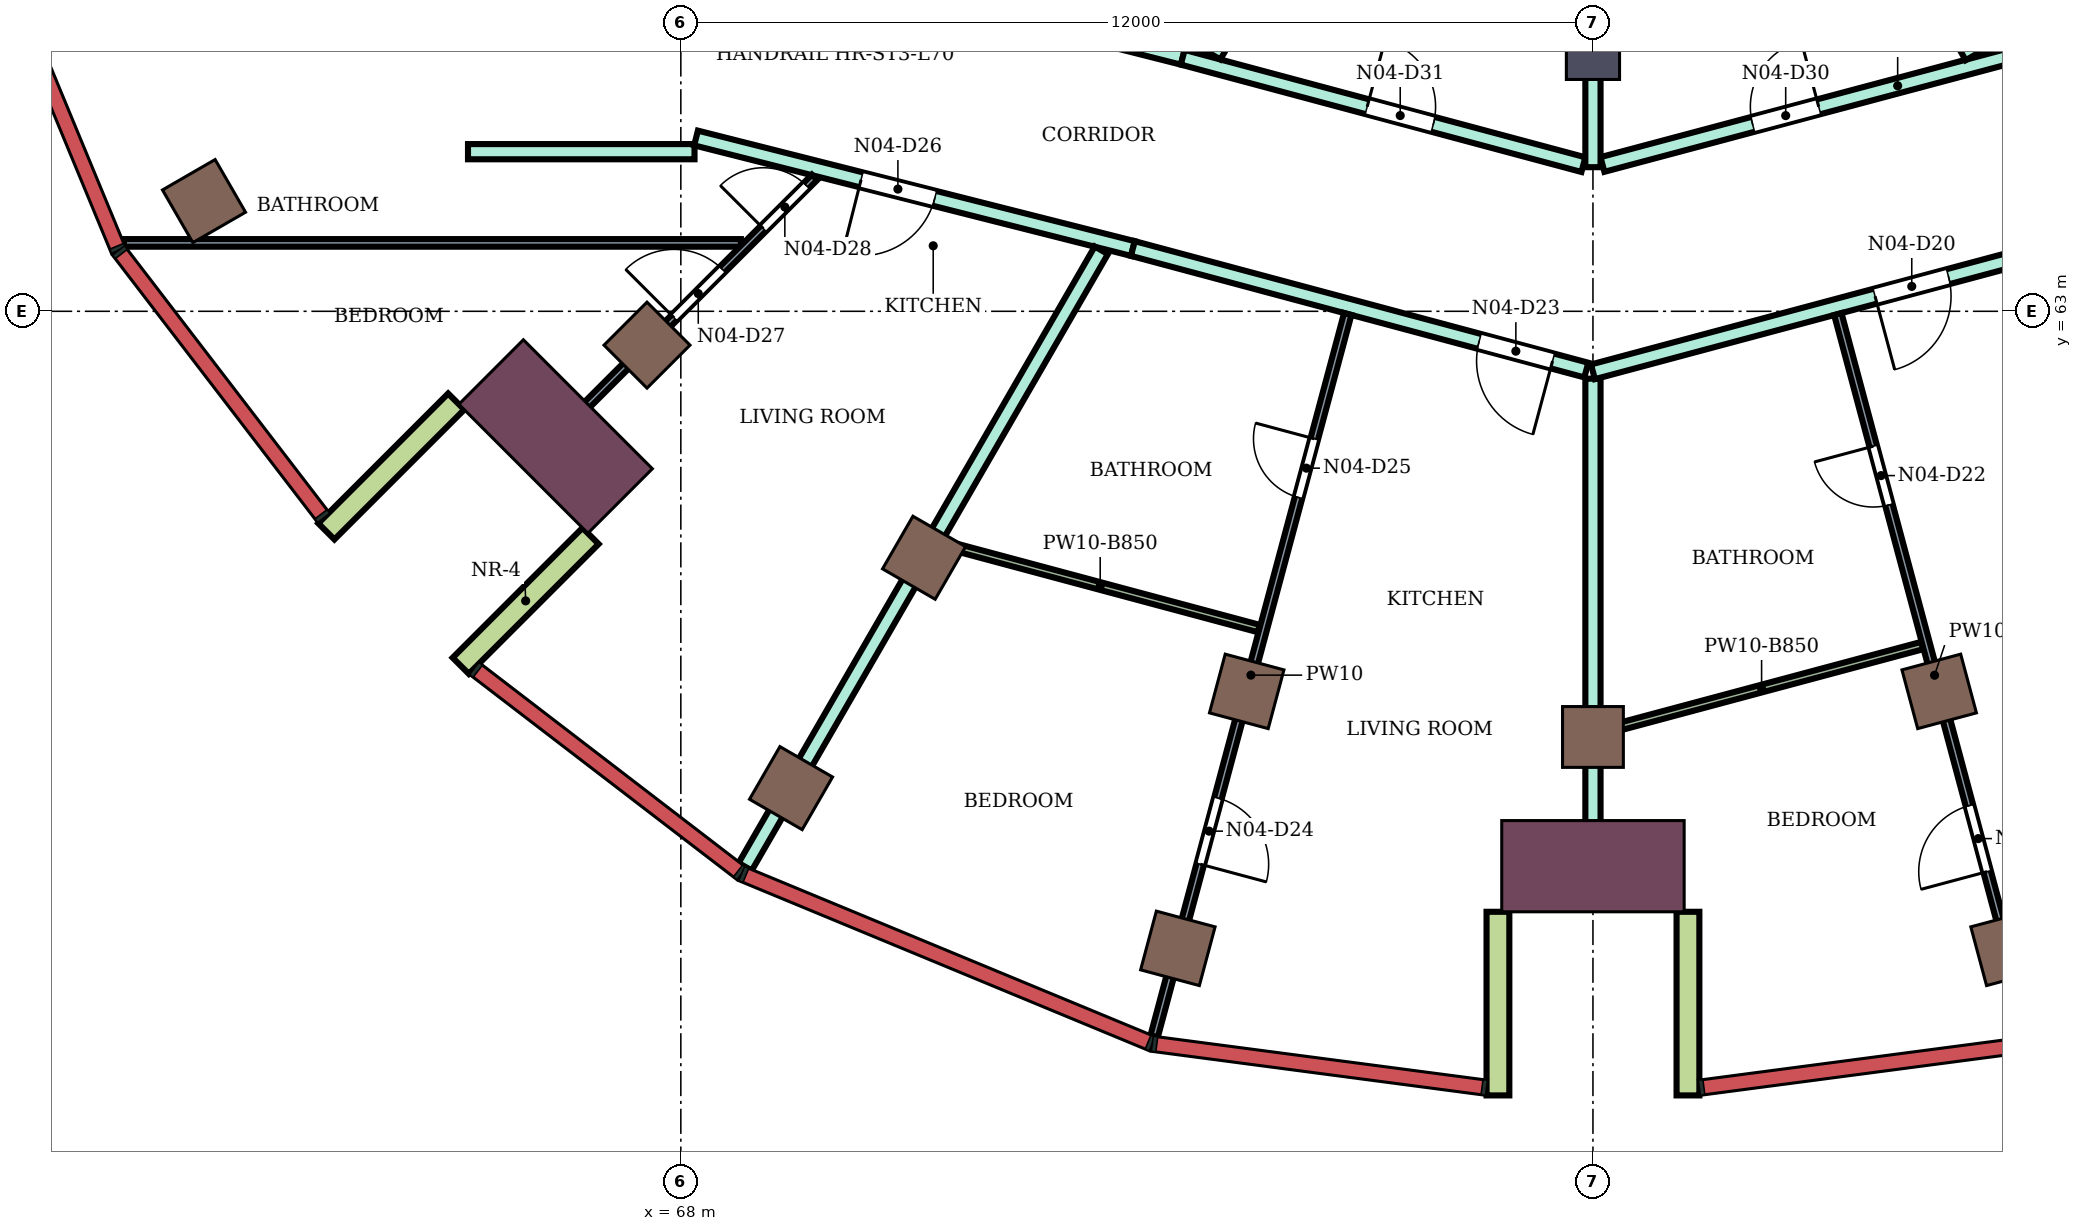
"""IFC4 building model, lengths in metres.
Left out: names, types, materials, properties, quantities, classifications, styles, units other than length and angle.
Written with IfcOpenShell. Run it as: python <this file> out.ifc"""

import sys

from ifc_helpers import new_model, si_unit, direction, frame, frame_2d, origin, origin_2d, place, context, subcontext, project, spatial, rectangle, extrude, element, fill, save


model = new_model("IFC4")
c1 = context("Model", 3, precision=1e-05, world=origin(), true_north=direction((0.0, 1.0)))
c2 = subcontext(c1, "Body", "Model", "MODEL_VIEW")
j1 = project(units=[si_unit("LENGTHUNIT", "METRE"), si_unit("PLANEANGLEUNIT", "RADIAN")], contexts=[c1])
p1 = place(None, origin())
s1 = spatial("IfcSite", under=j1, at=p1, CompositionType="ELEMENT")
p2 = place(p1, origin())
s2 = spatial("IfcBuilding", under=s1, at=p2, CompositionType="ELEMENT")
p3 = place(p2, frame((0.0, 0.0, 305.1)))
s3 = spatial("IfcBuildingStorey", under=s2, at=p3, CompositionType="ELEMENT", Elevation=305.1)
for number, where, z_axis, x_axis in (
    (1, (61.727, 64.45, 0.0), (0.0, 0.0, 1.0), (-0.866, -0.5, 0.0)),
    (2, (69.45, 56.727, 0.0), (0.0, 0.0, 1.0), (-0.5, -0.866, 0.0)),
    (3, (74.539, 54.619, 0.0), (0.0, 0.0, 1.0), (-0.259, -0.966, 0.0)),
    (4, (85.461, 54.619, 0.0), (0.0, 0.0, 1.0), (0.259, -0.966, 0.0)),
    (5, (67.555, 62.555, 0.0), (0.0, 0.0, 1.0), (-0.707, -0.707, 0.0)),
    (6, (71.2, 59.758, 0.0), (0.0, 0.0, 1.0), (-0.5, -0.866, 0.0)),
    (7, (75.445, 58.0, 0.0), (0.0, 0.0, 1.0), (-0.259, -0.966, 0.0)),
    (8, (80.0, 57.4, 0.0), (0.0, 0.0, 1.0), (0.0, -1.0, 0.0)),
    (9, (84.555, 58.0, 0.0), (0.0, 0.0, 1.0), (0.259, -0.966, 0.0)),
):
    element("IfcColumn", number, at=place(p3, frame(where, z_axis=z_axis, x_axis=x_axis)), inside=s3, PredefinedType="COLUMN", context=c2, shape_type="SweptSolid", body=[
        extrude(rectangle(XDim=0.8, YDim=0.8, at=origin_2d()), origin(), (0.0, 0.0, 1.0), 4.2),
    ])
p4 = place(p3, frame((80.0, 66.4, 0.0), z_axis=(0.0, 0.0, 1.0), x_axis=(0.0, -1.0, 0.0)))
e10 = element("IfcColumn", 10, at=p4, inside=s3, PredefinedType="COLUMN", context=c2, shape_type="SweptSolid", body=[
    extrude(rectangle(XDim=0.7, YDim=0.7, at=origin_2d()), origin(), (0.0, 0.0, 1.0), 4.2),
])
for number, where, z_axis, x_axis in (
    (11, (66.353, 61.353, 0.0), (0.0, 0.0, 1.0), (-0.707, -0.707, 0.0)),
    (12, (80.0, 55.7, 0.0), (0.0, 0.0, 1.0), (0.0, -1.0, 0.0)),
):
    element("IfcColumn", number, at=place(p3, frame(where, z_axis=z_axis, x_axis=x_axis)), inside=s3, PredefinedType="COLUMN", context=c2, shape_type="SweptSolid", body=[
        extrude(rectangle(XDim=1.2, YDim=2.4, at=origin_2d()), origin(), (0.0, 0.0, 1.0), 4.2),
    ])
for number, where, z_axis, x_axis in (
    (13, (65.045, 61.812, 0.0), (0.0, 0.0, 1.0), (-0.707, -0.707, 0.0)),
    (14, (66.812, 60.045, 0.0), (0.0, 0.0, 1.0), (-0.707, -0.707, 0.0)),
    (15, (78.75, 55.1, 0.0), (0.0, 0.0, 1.0), (0.0, -1.0, 0.0)),
    (16, (81.25, 55.1, 0.0), (0.0, 0.0, 1.0), (0.0, -1.0, 0.0)),
):
    element("IfcWall", number, at=place(p3, frame(where, z_axis=z_axis, x_axis=x_axis)), inside=s3, PredefinedType="NOTDEFINED", context=c2, shape_type="SweptSolid", body=[
        extrude(rectangle(XDim=2.416, YDim=0.3, at=frame_2d((1.208, 0.0))), origin(), (0.0, 0.0, 1.0), 4.2),
    ])
p5 = place(p3, frame((65.2, 65.1, 0.0), z_axis=(0.0, 0.0, 1.0), x_axis=(1.0, 0.0, 0.0)))
e17 = element("IfcWall", 17, at=p5, inside=s3, PredefinedType="PARTITIONING", context=c2, shape_type="SweptSolid", body=[
    extrude(rectangle(XDim=2.98, YDim=0.2, at=frame_2d((1.49, 0.0))), origin(), (0.0, 0.0, 1.0), 3.75),
])
p6 = place(p3, frame((68.2, 65.28, 0.0), z_axis=(0.0, 0.0, 1.0), x_axis=(0.969450596516, -0.245286650503, 0.0)))
e18 = element("IfcWall", 18, at=p6, inside=s3, PredefinedType="PARTITIONING", context=c2, shape_type="SweptSolid", body=[
    extrude(rectangle(XDim=5.928, YDim=0.2, at=frame_2d((2.964, 0.0))), origin(), (0.0, 0.0, 1.0), 3.75),
])
p7 = place(p6, frame((2.24, 0.0, 0.0)))
e19 = element("IfcOpeningElement", 19, at=p7, cuts=e18, PredefinedType="OPENING", context=c2, shape_type="SweptSolid", body=[
    extrude(rectangle(XDim=1.0, YDim=2.1, at=frame_2d((0.5, 1.05))), frame((0.0, 0.11, 0.0), z_axis=(0.0, -1.0, 0.0), x_axis=(1.0, 0.0, 0.0)), (0.0, 0.0, 1.0), 0.22),
])
p8 = place(p3, frame((68.846, 55.692, 0.0), z_axis=(0.0, 0.0, 1.0), x_axis=(0.500273689503, 0.865867331403, 0.0)))
e20 = element("IfcWall", 20, at=p8, inside=s3, PredefinedType="PARTITIONING", context=c2, shape_type="SweptSolid", body=[
    extrude(rectangle(XDim=9.366, YDim=0.2, at=frame_2d((4.683, 0.0))), origin(), (0.0, 0.0, 1.0), 3.75),
])
p9 = place(p3, frame((72.1, 66.975, 0.0), z_axis=(0.0, 0.0, 1.0), x_axis=(0.969471314457, -0.245204752086, 0.0)))
e21 = element("IfcWall", 21, at=p9, inside=s3, PredefinedType="PARTITIONING", context=c2, shape_type="SweptSolid", body=[
    extrude(rectangle(XDim=2.582, YDim=0.2, at=frame_2d((1.291, 0.0))), origin(), (0.0, 0.0, 1.0), 3.75),
])
p10 = place(p9, frame((0.841, 0.0, 0.0)))
e22 = element("IfcOpeningElement", 22, at=p10, cuts=e21, PredefinedType="OPENING", context=c2, shape_type="SweptSolid", body=[
    extrude(rectangle(XDim=0.9, YDim=2.1, at=frame_2d((0.45, 1.05))), frame((0.0, 0.11, 0.0), z_axis=(0.0, -1.0, 0.0), x_axis=(1.0, 0.0, 0.0)), (0.0, 0.0, 1.0), 0.22),
])
p11 = place(p3, frame((73.947, 63.826, 0.0), z_axis=(0.0, 0.0, 1.0), x_axis=(0.965902169454, -0.258907317479, 0.0)))
e23 = element("IfcWall", 23, at=p11, inside=s3, PredefinedType="PARTITIONING", context=c2, shape_type="SweptSolid", body=[
    extrude(rectangle(XDim=6.177, YDim=0.2, at=frame_2d((3.088, 0.0))), origin(), (0.0, 0.0, 1.0), 3.75),
])
p12 = place(p11, frame((4.717, 0.0, 0.0)))
e24 = element("IfcOpeningElement", 24, at=p12, cuts=e23, PredefinedType="OPENING", context=c2, shape_type="SweptSolid", body=[
    extrude(rectangle(XDim=1.0, YDim=2.1, at=frame_2d((0.5, 1.05))), frame((0.0, 0.11, 0.0), z_axis=(0.0, -1.0, 0.0), x_axis=(1.0, 0.0, 0.0)), (0.0, 0.0, 1.0), 0.22),
])
p13 = place(p3, frame((74.603, 66.342, 0.0), z_axis=(0.0, 0.0, 1.0), x_axis=(0.965920893652, -0.258837453254, 0.0)))
e25 = element("IfcWall", 25, at=p13, inside=s3, PredefinedType="PARTITIONING", context=c2, shape_type="SweptSolid", body=[
    extrude(rectangle(XDim=5.458, YDim=0.2, at=frame_2d((2.729, 0.0))), origin(), (0.0, 0.0, 1.0), 3.75),
])
p14 = place(p13, frame((2.512, 0.0, 0.0)))
e26 = element("IfcOpeningElement", 26, at=p14, cuts=e25, PredefinedType="OPENING", context=c2, shape_type="SweptSolid", body=[
    extrude(rectangle(XDim=0.9, YDim=2.1, at=frame_2d((0.45, 1.05))), frame((0.0, 0.11, 0.0), z_axis=(0.0, -1.0, 0.0), x_axis=(1.0, 0.0, 0.0)), (0.0, 0.0, 1.0), 0.22),
])
p15 = place(p3, frame((75.012, 66.363, 0.0), z_axis=(0.0, 0.0, 1.0), x_axis=(0.500223967704, 0.86589605735, 0.0)))
e27 = element("IfcWall", 27, at=p15, inside=s3, PredefinedType="PARTITIONING", context=c2, shape_type="SweptSolid", body=[
    extrude(rectangle(XDim=2.275, YDim=0.2, at=frame_2d((1.138, 0.0))), origin(), (0.0, 0.0, 1.0), 3.75),
])
p16 = place(p3, frame((80.125, 64.932, 0.0), z_axis=(0.0, 0.0, 1.0), x_axis=(0.966236955806, 0.257655089674, 0.0)))
e28 = element("IfcWall", 28, at=p16, inside=s3, PredefinedType="PARTITIONING", context=c2, shape_type="SweptSolid", body=[
    extrude(rectangle(XDim=8.039, YDim=0.2, at=frame_2d((4.02, 0.0))), origin(), (0.0, 0.0, 1.0), 3.75),
])
p17 = place(p16, frame((6.298, 0.0, 0.0)))
e29 = element("IfcOpeningElement", 29, at=p17, cuts=e28, PredefinedType="OPENING", context=c2, shape_type="SweptSolid", body=[
    extrude(rectangle(XDim=0.9, YDim=2.1, at=frame_2d((0.45, 1.05))), frame((0.0, 0.11, 0.0), z_axis=(0.0, -1.0, 0.0), x_axis=(1.0, 0.0, 0.0)), (0.0, 0.0, 1.0), 0.22),
])
p18 = place(p16, frame((2.045, 0.0, 0.0)))
e30 = element("IfcOpeningElement", 30, at=p18, cuts=e28, PredefinedType="OPENING", context=c2, shape_type="SweptSolid", body=[
    extrude(rectangle(XDim=0.9, YDim=2.1, at=frame_2d((0.45, 1.05))), frame((0.0, 0.11, 0.0), z_axis=(0.0, -1.0, 0.0), x_axis=(1.0, 0.0, 0.0)), (0.0, 0.0, 1.0), 0.22),
])
p19 = place(p3, frame((80.0, 55.3, 0.0), z_axis=(0.0, 0.0, 1.0), x_axis=(0.0, 1.0, 0.0)))
e31 = element("IfcWall", 31, at=p19, inside=s3, PredefinedType="PARTITIONING", context=c2, shape_type="SweptSolid", body=[
    extrude(rectangle(XDim=6.814, YDim=0.2, at=frame_2d((3.407, 0.0))), origin(), (0.0, 0.0, 1.0), 3.75),
])
p20 = place(p3, frame((80.0, 62.204, 0.0), z_axis=(0.0, 0.0, 1.0), x_axis=(0.965938139786, 0.258773086132, 0.0)))
e32 = element("IfcWall", 32, at=p20, inside=s3, PredefinedType="PARTITIONING", context=c2, shape_type="SweptSolid", body=[
    extrude(rectangle(XDim=6.266, YDim=0.2, at=frame_2d((3.133, 0.0))), origin(), (0.0, 0.0, 1.0), 3.75),
])
p21 = place(p20, frame((3.842, 0.0, 0.0)))
e33 = element("IfcOpeningElement", 33, at=p21, cuts=e32, PredefinedType="OPENING", context=c2, shape_type="SweptSolid", body=[
    extrude(rectangle(XDim=1.0, YDim=2.1, at=frame_2d((0.5, 1.05))), frame((0.0, 0.11, 0.0), z_axis=(0.0, -1.0, 0.0), x_axis=(1.0, 0.0, 0.0)), (0.0, 0.0, 1.0), 0.22),
])
p22 = place(p3, frame((80.0, 64.896, 0.0), z_axis=(0.0, 0.0, 1.0), x_axis=(0.0, 1.0, 0.0)))
e34 = element("IfcWall", 34, at=p22, inside=s3, PredefinedType="PARTITIONING", context=c2, shape_type="SweptSolid", body=[
    extrude(rectangle(XDim=2.405, YDim=0.2, at=frame_2d((1.203, 0.0))), origin(), (0.0, 0.0, 1.0), 3.75),
])
p23 = place(p3, frame((83.848, 68.333, 0.0), z_axis=(0.0, 0.0, 1.0), x_axis=(0.499873506666, -0.866098422429, 0.0)))
e35 = element("IfcWall", 35, at=p23, inside=s3, PredefinedType="PARTITIONING", context=c2, shape_type="SweptSolid", body=[
    extrude(rectangle(XDim=2.285, YDim=0.2, at=frame_2d((1.143, 0.0))), origin(), (0.0, 0.0, 1.0), 3.75),
])
p24 = place(p3, frame((60.673, 63.9, 0.0), z_axis=(0.0, 0.0, 1.0), x_axis=(1.0, 0.0, 0.0)))
e36 = element("IfcWall", 36, at=p24, inside=s3, PredefinedType="PARTITIONING", context=c2, shape_type="SweptSolid", body=[
    extrude(rectangle(XDim=8.117, YDim=0.1, at=frame_2d((4.059, 0.0))), origin(), (0.0, 0.0, 1.0), 3.75),
])
p25 = place(p3, frame((66.068, 61.073, 0.0), z_axis=(0.0, 0.0, 1.0), x_axis=(0.707247084787, 0.706966449742, 0.0)))
e37 = element("IfcWall", 37, at=p25, inside=s3, PredefinedType="PARTITIONING", context=c2, shape_type="SweptSolid", body=[
    extrude(rectangle(XDim=5.22, YDim=0.1, at=frame_2d((2.61, 0.0))), origin(), (0.0, 0.0, 1.0), 3.75),
])
p26 = place(p25, frame((2.606, 0.0, 0.0)))
e38 = element("IfcOpeningElement", 38, at=p26, cuts=e37, PredefinedType="OPENING", context=c2, shape_type="SweptSolid", body=[
    extrude(rectangle(XDim=0.9, YDim=2.1, at=frame_2d((0.45, 1.05))), frame((0.0, 0.06, 0.0), z_axis=(0.0, -1.0, 0.0), x_axis=(1.0, 0.0, 0.0)), (0.0, 0.0, 1.0), 0.12),
])
p27 = place(p25, frame((4.267, 0.0, 0.0)))
e39 = element("IfcOpeningElement", 39, at=p27, cuts=e37, PredefinedType="OPENING", context=c2, shape_type="SweptSolid", body=[
    extrude(rectangle(XDim=0.8, YDim=2.1, at=frame_2d((0.4, 1.05))), frame((0.0, 0.06, 0.0), z_axis=(0.0, -1.0, 0.0), x_axis=(1.0, 0.0, 0.0)), (0.0, 0.0, 1.0), 0.12),
])
p28 = place(p3, frame((71.43, 59.946, 0.0), z_axis=(0.0, 0.0, 1.0), x_axis=(0.965877663225, -0.258998725254, 0.0)))
e40 = element("IfcWall", 40, at=p28, inside=s3, PredefinedType="PARTITIONING", context=c2, shape_type="SweptSolid", body=[
    extrude(rectangle(XDim=4.321, YDim=0.1, at=frame_2d((2.161, 0.0))), origin(), (0.0, 0.0, 1.0), 3.35),
])
p29 = place(p3, frame((74.227, 53.462, 0.0), z_axis=(0.0, 0.0, 1.0), x_axis=(0.258915123069, 0.965900077154, 0.0)))
e41 = element("IfcWall", 41, at=p29, inside=s3, PredefinedType="PARTITIONING", context=c2, shape_type="SweptSolid", body=[
    extrude(rectangle(XDim=9.838, YDim=0.1, at=frame_2d((4.919, 0.0))), origin(), (0.0, 0.0, 1.0), 3.75),
])
p30 = place(p29, frame((2.344, 0.0, 0.0)))
e42 = element("IfcOpeningElement", 42, at=p30, cuts=e41, PredefinedType="OPENING", context=c2, shape_type="SweptSolid", body=[
    extrude(rectangle(XDim=0.9, YDim=2.1, at=frame_2d((0.45, 1.05))), frame((0.0, 0.06, 0.0), z_axis=(0.0, -1.0, 0.0), x_axis=(1.0, 0.0, 0.0)), (0.0, 0.0, 1.0), 0.12),
])
p31 = place(p29, frame((7.338, 0.0, 0.0)))
e43 = element("IfcOpeningElement", 43, at=p31, cuts=e41, PredefinedType="OPENING", context=c2, shape_type="SweptSolid", body=[
    extrude(rectangle(XDim=0.8, YDim=2.1, at=frame_2d((0.4, 1.05))), frame((0.0, 0.06, 0.0), z_axis=(0.0, -1.0, 0.0), x_axis=(1.0, 0.0, 0.0)), (0.0, 0.0, 1.0), 0.12),
])
p32 = place(p3, frame((80.106, 57.47, 0.0), z_axis=(0.0, 0.0, 1.0), x_axis=(0.96592388346, 0.25882629573, 0.0)))
e44 = element("IfcWall", 44, at=p32, inside=s3, PredefinedType="PARTITIONING", context=c2, shape_type="SweptSolid", body=[
    extrude(rectangle(XDim=4.374, YDim=0.1, at=frame_2d((2.187, 0.0))), origin(), (0.0, 0.0, 1.0), 3.35),
])
p33 = place(p3, frame((83.222, 62.964, 0.0), z_axis=(0.0, 0.0, 1.0), x_axis=(0.25865876373, -0.965968759301, 0.0)))
e45 = element("IfcWall", 45, at=p33, inside=s3, PredefinedType="PARTITIONING", context=c2, shape_type="SweptSolid", body=[
    extrude(rectangle(XDim=9.838, YDim=0.1, at=frame_2d((4.919, 0.0))), origin(), (0.0, 0.0, 1.0), 3.75),
])
p34 = place(p33, frame((6.694, 0.0, 0.0)))
e46 = element("IfcOpeningElement", 46, at=p34, cuts=e45, PredefinedType="OPENING", context=c2, shape_type="SweptSolid", body=[
    extrude(rectangle(XDim=0.9, YDim=2.1, at=frame_2d((0.45, 1.05))), frame((0.0, 0.06, 0.0), z_axis=(0.0, -1.0, 0.0), x_axis=(1.0, 0.0, 0.0)), (0.0, 0.0, 1.0), 0.12),
])
p35 = place(p33, frame((1.8, 0.0, 0.0)))
e47 = element("IfcOpeningElement", 47, at=p35, cuts=e45, PredefinedType="OPENING", context=c2, shape_type="SweptSolid", body=[
    extrude(rectangle(XDim=0.8, YDim=2.1, at=frame_2d((0.4, 1.05))), frame((0.0, 0.06, 0.0), z_axis=(0.0, -1.0, 0.0), x_axis=(1.0, 0.0, 0.0)), (0.0, 0.0, 1.0), 0.12),
])
p36 = place(p21, frame((1.0, 0.0, 0.0), z_axis=(0.0, 0.0, 1.0), x_axis=(-1.0, 0.0, 0.0)))
e48 = element("IfcDoor", 48, at=p36, inside=s3, OperationType="SINGLE_SWING_RIGHT", PredefinedType="DOOR", context=c2, shape_type="SweptSolid", body=[
    extrude(rectangle(XDim=1.0, YDim=2.1, at=frame_2d((0.5, 1.05))), frame((0.0, 0.025, 0.0), z_axis=(0.0, -1.0, 0.0), x_axis=(1.0, 0.0, 0.0)), (0.0, 0.0, 1.0), 0.05),
])
fill(e33, e48)
p37 = place(p34, frame((0.9, 0.0, 0.0), z_axis=(0.0, 0.0, 1.0), x_axis=(-1.0, 0.0, 0.0)))
e49 = element("IfcDoor", 49, at=p37, inside=s3, OperationType="SINGLE_SWING_LEFT", PredefinedType="DOOR", context=c2, shape_type="SweptSolid", body=[
    extrude(rectangle(XDim=0.9, YDim=2.1, at=frame_2d((0.45, 1.05))), frame((0.0, 0.025, 0.0), z_axis=(0.0, -1.0, 0.0), x_axis=(1.0, 0.0, 0.0)), (0.0, 0.0, 1.0), 0.05),
])
fill(e46, e49)
p38 = place(p35, frame((0.8, 0.0, 0.0), z_axis=(0.0, 0.0, 1.0), x_axis=(-1.0, 0.0, 0.0)))
e50 = element("IfcDoor", 50, at=p38, inside=s3, OperationType="SINGLE_SWING_RIGHT", PredefinedType="DOOR", context=c2, shape_type="SweptSolid", body=[
    extrude(rectangle(XDim=0.8, YDim=2.1, at=frame_2d((0.4, 1.05))), frame((0.0, 0.025, 0.0), z_axis=(0.0, -1.0, 0.0), x_axis=(1.0, 0.0, 0.0)), (0.0, 0.0, 1.0), 0.05),
])
fill(e47, e50)
p39 = place(p12, frame((1.0, 0.0, 0.0), z_axis=(0.0, 0.0, 1.0), x_axis=(-1.0, 0.0, 0.0)))
e51 = element("IfcDoor", 51, at=p39, inside=s3, OperationType="SINGLE_SWING_LEFT", PredefinedType="DOOR", context=c2, shape_type="SweptSolid", body=[
    extrude(rectangle(XDim=1.0, YDim=2.1, at=frame_2d((0.5, 1.05))), frame((0.0, 0.025, 0.0), z_axis=(0.0, -1.0, 0.0), x_axis=(1.0, 0.0, 0.0)), (0.0, 0.0, 1.0), 0.05),
])
fill(e24, e51)
p40 = place(p30, frame((0.9, 0.0, 0.0), z_axis=(0.0, 0.0, 1.0), x_axis=(-1.0, 0.0, 0.0)))
e52 = element("IfcDoor", 52, at=p40, inside=s3, OperationType="SINGLE_SWING_RIGHT", PredefinedType="DOOR", context=c2, shape_type="SweptSolid", body=[
    extrude(rectangle(XDim=0.9, YDim=2.1, at=frame_2d((0.45, 1.05))), frame((0.0, 0.025, 0.0), z_axis=(0.0, -1.0, 0.0), x_axis=(1.0, 0.0, 0.0)), (0.0, 0.0, 1.0), 0.05),
])
fill(e42, e52)
p41 = place(p31, origin())
e53 = element("IfcDoor", 53, at=p41, inside=s3, OperationType="SINGLE_SWING_RIGHT", PredefinedType="DOOR", context=c2, shape_type="SweptSolid", body=[
    extrude(rectangle(XDim=0.8, YDim=2.1, at=frame_2d((0.4, 1.05))), frame((0.0, 0.025, 0.0), z_axis=(0.0, -1.0, 0.0), x_axis=(1.0, 0.0, 0.0)), (0.0, 0.0, 1.0), 0.05),
])
fill(e43, e53)
p42 = place(p7, frame((1.0, 0.0, 0.0), z_axis=(0.0, 0.0, 1.0), x_axis=(-1.0, 0.0, 0.0)))
e54 = element("IfcDoor", 54, at=p42, inside=s3, OperationType="SINGLE_SWING_RIGHT", PredefinedType="DOOR", context=c2, shape_type="SweptSolid", body=[
    extrude(rectangle(XDim=1.0, YDim=2.1, at=frame_2d((0.5, 1.05))), frame((0.0, 0.025, 0.0), z_axis=(0.0, -1.0, 0.0), x_axis=(1.0, 0.0, 0.0)), (0.0, 0.0, 1.0), 0.05),
])
fill(e19, e54)
p43 = place(p26, origin())
e55 = element("IfcDoor", 55, at=p43, inside=s3, OperationType="SINGLE_SWING_LEFT", PredefinedType="DOOR", context=c2, shape_type="SweptSolid", body=[
    extrude(rectangle(XDim=0.9, YDim=2.1, at=frame_2d((0.45, 1.05))), frame((0.0, 0.025, 0.0), z_axis=(0.0, -1.0, 0.0), x_axis=(1.0, 0.0, 0.0)), (0.0, 0.0, 1.0), 0.05),
])
fill(e38, e55)
p44 = place(p27, origin())
e56 = element("IfcDoor", 56, at=p44, inside=s3, OperationType="SINGLE_SWING_LEFT", PredefinedType="DOOR", context=c2, shape_type="SweptSolid", body=[
    extrude(rectangle(XDim=0.8, YDim=2.1, at=frame_2d((0.4, 1.05))), frame((0.0, 0.025, 0.0), z_axis=(0.0, -1.0, 0.0), x_axis=(1.0, 0.0, 0.0)), (0.0, 0.0, 1.0), 0.05),
])
fill(e39, e56)
p45 = place(p18, origin())
e57 = element("IfcDoor", 57, at=p45, inside=s3, OperationType="SINGLE_SWING_RIGHT", PredefinedType="DOOR", context=c2, shape_type="SweptSolid", body=[
    extrude(rectangle(XDim=0.9, YDim=2.1, at=frame_2d((0.45, 1.05))), frame((0.0, 0.025, 0.0), z_axis=(0.0, -1.0, 0.0), x_axis=(1.0, 0.0, 0.0)), (0.0, 0.0, 1.0), 0.05),
])
fill(e30, e57)
p46 = place(p14, origin())
e58 = element("IfcDoor", 58, at=p46, inside=s3, OperationType="SINGLE_SWING_LEFT", PredefinedType="DOOR", context=c2, shape_type="SweptSolid", body=[
    extrude(rectangle(XDim=0.9, YDim=2.1, at=frame_2d((0.45, 1.05))), frame((0.0, 0.025, 0.0), z_axis=(0.0, -1.0, 0.0), x_axis=(1.0, 0.0, 0.0)), (0.0, 0.0, 1.0), 0.05),
])
fill(e26, e58)
save(model, sys.argv[1])
